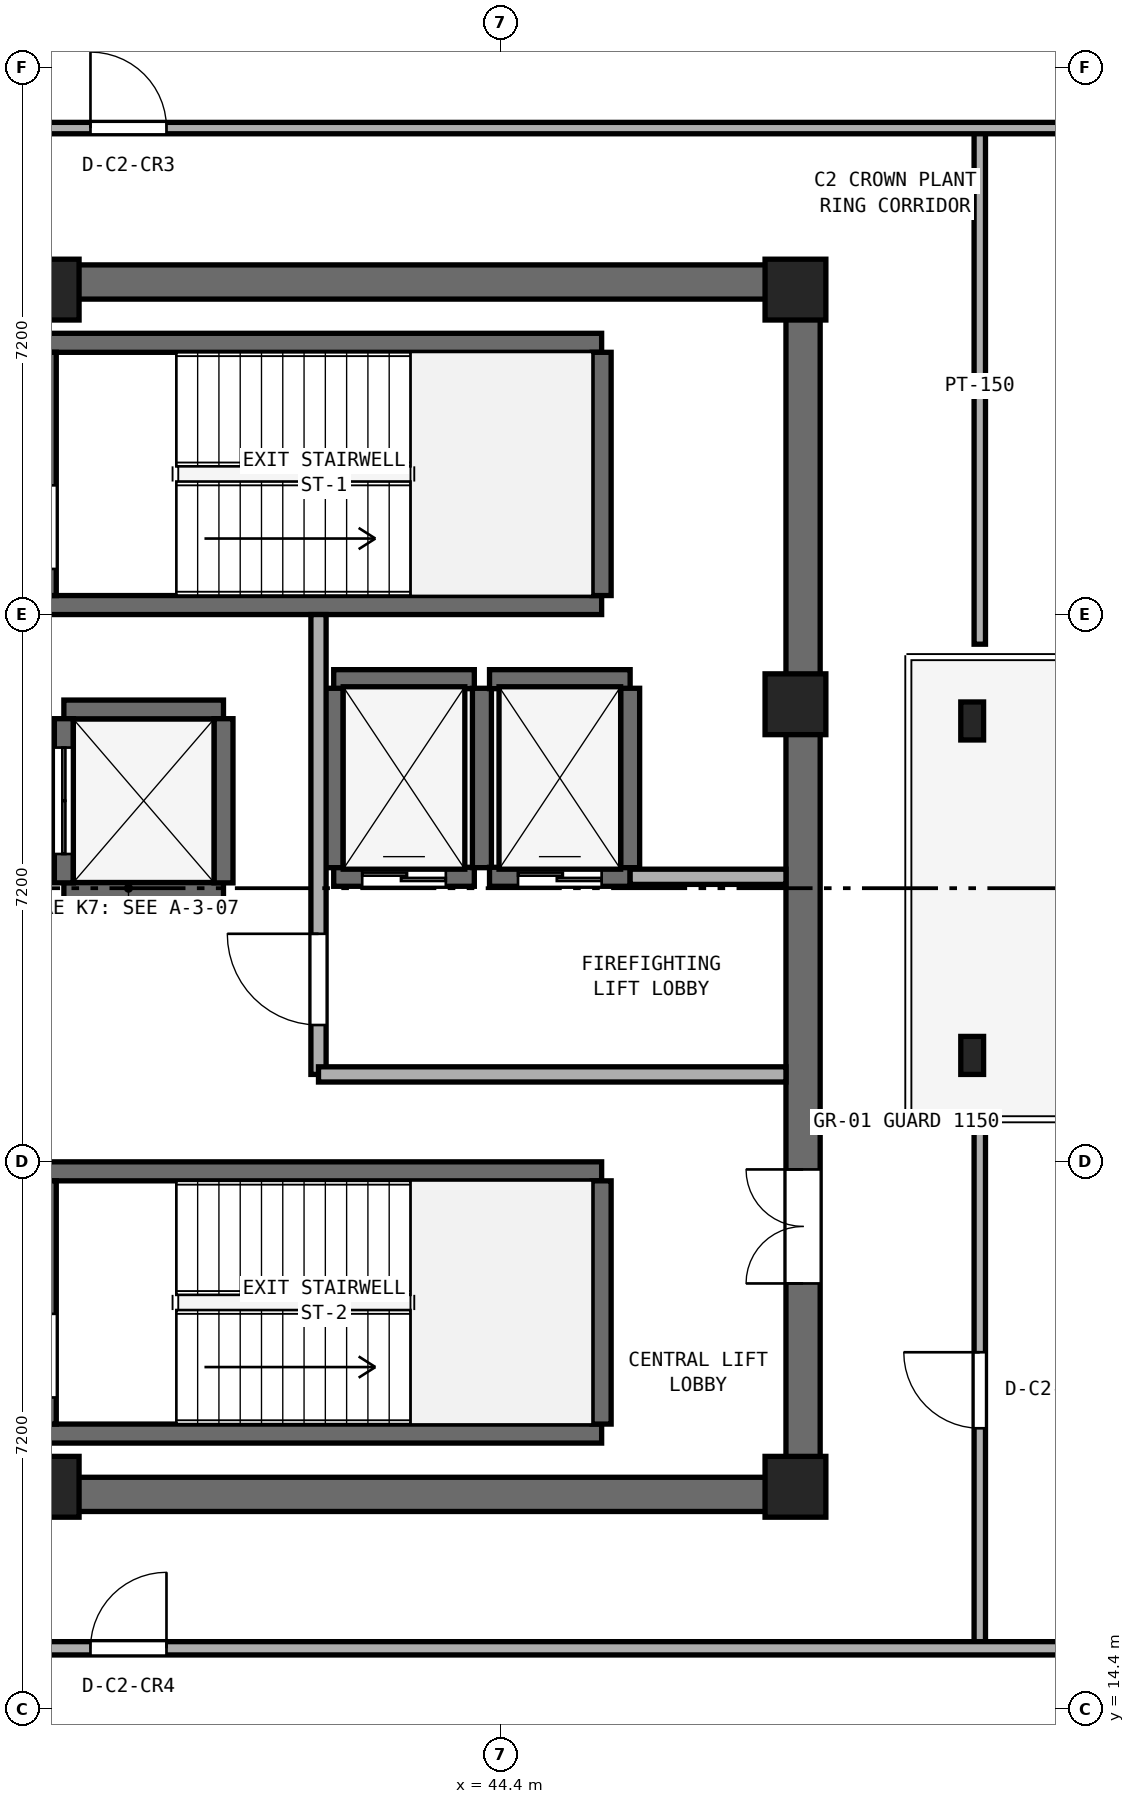
"""IFC4 building model, lengths in metres.
Left out: names, types, materials, properties, quantities, classifications, styles, units other than length and angle.
Written with IfcOpenShell. Run it as: python <this file> out.ifc"""

import sys

from ifc_helpers import new_model, si_unit, direction, frame, frame_2d, origin, origin_2d, place, context, subcontext, project, spatial, rectangle, i_section, extrude, element, fill, save


model = new_model("IFC4")
c1 = context("Model", 3, precision=1e-05, world=origin(), true_north=direction((0.0, 1.0)))
c2 = subcontext(c1, "Body", "Model", "MODEL_VIEW")
j1 = project(units=[si_unit("LENGTHUNIT", "METRE"), si_unit("PLANEANGLEUNIT", "RADIAN")], contexts=[c1])
p1 = place(None, origin())
s1 = spatial("IfcSite", under=j1, at=p1, CompositionType="ELEMENT")
p2 = place(p1, origin())
s2 = spatial("IfcBuilding", under=s1, at=p2, CompositionType="ELEMENT")
p3 = place(p2, frame((0.0, 0.0, 317.4)))
s3 = spatial("IfcBuildingStorey", under=s2, at=p3, CompositionType="ELEMENT", Elevation=317.4)
for number, where, z_axis, x_axis in (
    (1, (50.6, 23.0, 0.0), (0.0, 0.0, 1.0), (1.0, 0.0, 0.0)),
    (2, (50.6, 27.4, 0.0), (0.0, 0.0, 1.0), (1.0, 0.0, 0.0)),
):
    element("IfcColumn", number, at=place(p3, frame(where, z_axis=z_axis, x_axis=x_axis)), inside=s3, PredefinedType="COLUMN", context=c2, shape_type="SweptSolid", body=[
        extrude(i_section(OverallWidth=0.3, OverallDepth=0.5, WebThickness=0.014, FlangeThickness=0.028, at=origin_2d()), origin(), (0.0, 0.0, 1.0), 3.72),
    ])
for number, where, z_axis, x_axis in (
    (3, (30.4, 17.225, 0.0), (0.0, 0.0, 1.0), (1.0, 0.0, 0.0)),
    (4, (30.4, 33.175, 0.0), (0.0, 0.0, 1.0), (1.0, 0.0, 0.0)),
):
    element("IfcWall", number, at=place(p3, frame(where, z_axis=z_axis, x_axis=x_axis)), inside=s3, PredefinedType="SHEAR", context=c2, shape_type="SweptSolid", body=[
        extrude(rectangle(XDim=18.2, YDim=0.45, at=frame_2d((9.1, 0.0))), origin(), (0.0, 0.0, 1.0), 3.72),
    ])
p4 = place(p3, frame((48.375, 17.45, 0.0), z_axis=(0.0, 0.0, 1.0), x_axis=(0.0, 1.0, 0.0)))
e5 = element("IfcWall", 5, at=p4, inside=s3, PredefinedType="SHEAR", context=c2, shape_type="SweptSolid", body=[
    extrude(rectangle(XDim=15.5, YDim=0.45, at=frame_2d((7.75, 0.0))), origin(), (0.0, 0.0, 1.0), 3.72),
])
p5 = place(p4, frame((2.55, 0.0, 0.0)))
e6 = element("IfcOpeningElement", 6, at=p5, cuts=e5, PredefinedType="OPENING", context=c2, shape_type="SweptSolid", body=[
    extrude(rectangle(XDim=1.5, YDim=2.15, at=frame_2d((0.75, 1.075))), frame((0.0, 0.235, 0.0), z_axis=(0.0, -1.0, 0.0), x_axis=(1.0, 0.0, 0.0)), (0.0, 0.0, 1.0), 0.47),
])
for number, where, z_axis, x_axis in (
    (7, (38.45, 17.325, 0.0), (0.0, 0.0, 1.0), (1.0, 0.0, 0.0)),
    (8, (48.275, 17.325, 0.0), (0.0, 0.0, 1.0), (1.0, 0.0, 0.0)),
    (9, (48.275, 27.62, 0.0), (0.0, 0.0, 1.0), (1.0, 0.0, 0.0)),
    (10, (48.275, 33.075, 0.0), (0.0, 0.0, 1.0), (1.0, 0.0, 0.0)),
    (11, (38.45, 33.075, 0.0), (0.0, 0.0, 1.0), (1.0, 0.0, 0.0)),
):
    element("IfcColumn", number, at=place(p3, frame(where, z_axis=z_axis, x_axis=x_axis)), inside=s3, PredefinedType="PILASTER", context=c2, shape_type="SweptSolid", body=[
        extrude(rectangle(XDim=0.8, YDim=0.8, at=origin_2d()), origin(), (0.0, 0.0, 1.0), 4.0),
    ])
for number, where, z_axis, x_axis in (
    (12, (38.425, 28.925, 0.0), (0.0, 0.0, 1.0), (1.0, 0.0, 0.0)),
    (13, (38.425, 32.375, 0.0), (0.0, 0.0, 1.0), (1.0, 0.0, 0.0)),
):
    element("IfcWall", number, at=place(p3, frame(where, z_axis=z_axis, x_axis=x_axis)), inside=s3, PredefinedType="SHEAR", context=c2, shape_type="SweptSolid", body=[
        extrude(rectangle(XDim=7.3, YDim=0.25, at=frame_2d((3.65, 0.0))), origin(), (0.0, 0.0, 1.0), 3.72),
    ])
p6 = place(p3, frame((38.425, 29.05, 0.0), z_axis=(0.0, 0.0, 1.0), x_axis=(0.0, 1.0, 0.0)))
e14 = element("IfcWall", 14, at=p6, inside=s3, PredefinedType="SHEAR", context=c2, shape_type="SweptSolid", body=[
    extrude(rectangle(XDim=3.2, YDim=0.25, at=frame_2d((1.6, 0.0))), origin(), (0.0, 0.0, 1.0), 3.72),
])
p7 = place(p6, frame((0.35, 0.0, 0.0)))
e15 = element("IfcOpeningElement", 15, at=p7, cuts=e14, PredefinedType="OPENING", context=c2, shape_type="SweptSolid", body=[
    extrude(rectangle(XDim=1.1, YDim=2.15, at=frame_2d((0.55, 1.075))), frame((0.0, 0.135, 0.0), z_axis=(0.0, -1.0, 0.0), x_axis=(1.0, 0.0, 0.0)), (0.0, 0.0, 1.0), 0.27),
])
p8 = place(p3, frame((45.725, 29.05, 0.0), z_axis=(0.0, 0.0, 1.0), x_axis=(0.0, 1.0, 0.0)))
e16 = element("IfcWall", 16, at=p8, inside=s3, PredefinedType="SHEAR", context=c2, shape_type="SweptSolid", body=[
    extrude(rectangle(XDim=3.2, YDim=0.25, at=frame_2d((1.6, 0.0))), origin(), (0.0, 0.0, 1.0), 3.72),
])
for number, where, z_axis, x_axis in (
    (17, (38.425, 18.025, 0.0), (0.0, 0.0, 1.0), (1.0, 0.0, 0.0)),
    (18, (38.425, 21.475, 0.0), (0.0, 0.0, 1.0), (1.0, 0.0, 0.0)),
):
    element("IfcWall", number, at=place(p3, frame(where, z_axis=z_axis, x_axis=x_axis)), inside=s3, PredefinedType="SHEAR", context=c2, shape_type="SweptSolid", body=[
        extrude(rectangle(XDim=7.3, YDim=0.25, at=frame_2d((3.65, 0.0))), origin(), (0.0, 0.0, 1.0), 3.72),
    ])
p9 = place(p3, frame((38.425, 18.15, 0.0), z_axis=(0.0, 0.0, 1.0), x_axis=(0.0, 1.0, 0.0)))
e19 = element("IfcWall", 19, at=p9, inside=s3, PredefinedType="SHEAR", context=c2, shape_type="SweptSolid", body=[
    extrude(rectangle(XDim=3.2, YDim=0.25, at=frame_2d((1.6, 0.0))), origin(), (0.0, 0.0, 1.0), 3.72),
])
p10 = place(p9, frame((0.35, 0.0, 0.0)))
e20 = element("IfcOpeningElement", 20, at=p10, cuts=e19, PredefinedType="OPENING", context=c2, shape_type="SweptSolid", body=[
    extrude(rectangle(XDim=1.1, YDim=2.15, at=frame_2d((0.55, 1.075))), frame((0.0, 0.135, 0.0), z_axis=(0.0, -1.0, 0.0), x_axis=(1.0, 0.0, 0.0)), (0.0, 0.0, 1.0), 0.27),
])
p11 = place(p3, frame((45.725, 18.15, 0.0), z_axis=(0.0, 0.0, 1.0), x_axis=(0.0, 1.0, 0.0)))
e21 = element("IfcWall", 21, at=p11, inside=s3, PredefinedType="SHEAR", context=c2, shape_type="SweptSolid", body=[
    extrude(rectangle(XDim=3.2, YDim=0.25, at=frame_2d((1.6, 0.0))), origin(), (0.0, 0.0, 1.0), 3.72),
])
p12 = place(p3, frame((42.2, 25.35, 0.0), z_axis=(0.0, 0.0, 1.0), x_axis=(1.0, 0.0, 0.0)))
e22 = element("IfcWall", 22, at=p12, inside=s3, PredefinedType="SHEAR", context=c2, shape_type="SweptSolid", body=[
    extrude(rectangle(XDim=1.85, YDim=0.25, at=frame_2d((0.925, 0.0))), origin(), (0.0, 0.0, 1.0), 3.72),
])
p13 = place(p12, frame((0.375, 0.0, 0.0)))
e23 = element("IfcOpeningElement", 23, at=p13, cuts=e22, PredefinedType="OPENING", context=c2, shape_type="SweptSolid", body=[
    extrude(rectangle(XDim=1.1, YDim=2.15, at=frame_2d((0.55, 1.075))), frame((0.0, 0.135, 0.0), z_axis=(0.0, -1.0, 0.0), x_axis=(1.0, 0.0, 0.0)), (0.0, 0.0, 1.0), 0.27),
])
p14 = place(p3, frame((42.2, 27.95, 0.0), z_axis=(0.0, 0.0, 1.0), x_axis=(1.0, 0.0, 0.0)))
e24 = element("IfcWall", 24, at=p14, inside=s3, PredefinedType="SHEAR", context=c2, shape_type="SweptSolid", body=[
    extrude(rectangle(XDim=1.85, YDim=0.25, at=frame_2d((0.925, 0.0))), origin(), (0.0, 0.0, 1.0), 3.72),
])
for number, where, z_axis, x_axis in (
    (25, (42.2, 25.47, 0.0), (0.0, 0.0, 1.0), (0.0, 1.0, 0.0)),
    (26, (44.15, 25.47, 0.0), (0.0, 0.0, 1.0), (0.0, 1.0, 0.0)),
):
    element("IfcWall", number, at=place(p3, frame(where, z_axis=z_axis, x_axis=x_axis)), inside=s3, PredefinedType="SHEAR", context=c2, shape_type="SweptSolid", body=[
        extrude(rectangle(XDim=2.36, YDim=0.25, at=frame_2d((1.18, 0.0))), origin(), (0.0, 0.0, 1.0), 3.72),
    ])
p15 = place(p3, frame((44.25, 25.35, 0.0), z_axis=(0.0, 0.0, 1.0), x_axis=(1.0, 0.0, 0.0)))
e27 = element("IfcWall", 27, at=p15, inside=s3, PredefinedType="SHEAR", context=c2, shape_type="SweptSolid", body=[
    extrude(rectangle(XDim=1.85, YDim=0.25, at=frame_2d((0.925, 0.0))), origin(), (0.0, 0.0, 1.0), 3.72),
])
p16 = place(p15, frame((0.375, 0.0, 0.0)))
e28 = element("IfcOpeningElement", 28, at=p16, cuts=e27, PredefinedType="OPENING", context=c2, shape_type="SweptSolid", body=[
    extrude(rectangle(XDim=1.1, YDim=2.15, at=frame_2d((0.55, 1.075))), frame((0.0, 0.135, 0.0), z_axis=(0.0, -1.0, 0.0), x_axis=(1.0, 0.0, 0.0)), (0.0, 0.0, 1.0), 0.27),
])
p17 = place(p3, frame((44.25, 27.95, 0.0), z_axis=(0.0, 0.0, 1.0), x_axis=(1.0, 0.0, 0.0)))
e29 = element("IfcWall", 29, at=p17, inside=s3, PredefinedType="SHEAR", context=c2, shape_type="SweptSolid", body=[
    extrude(rectangle(XDim=1.85, YDim=0.25, at=frame_2d((0.925, 0.0))), origin(), (0.0, 0.0, 1.0), 3.72),
])
p18 = place(p3, frame((46.1, 25.47, 0.0), z_axis=(0.0, 0.0, 1.0), x_axis=(0.0, 1.0, 0.0)))
e30 = element("IfcWall", 30, at=p18, inside=s3, PredefinedType="SHEAR", context=c2, shape_type="SweptSolid", body=[
    extrude(rectangle(XDim=2.36, YDim=0.25, at=frame_2d((1.18, 0.0))), origin(), (0.0, 0.0, 1.0), 3.72),
])
for number, where, z_axis, x_axis in (
    (31, (38.65, 25.15, 0.0), (0.0, 0.0, 1.0), (1.0, 0.0, 0.0)),
    (32, (38.65, 27.55, 0.0), (0.0, 0.0, 1.0), (1.0, 0.0, 0.0)),
):
    element("IfcWall", number, at=place(p3, frame(where, z_axis=z_axis, x_axis=x_axis)), inside=s3, PredefinedType="SHEAR", context=c2, shape_type="SweptSolid", body=[
        extrude(rectangle(XDim=2.1, YDim=0.25, at=frame_2d((1.05, 0.0))), origin(), (0.0, 0.0, 1.0), 3.72),
    ])
p19 = place(p3, frame((38.65, 25.27, 0.0), z_axis=(0.0, 0.0, 1.0), x_axis=(0.0, 1.0, 0.0)))
e33 = element("IfcWall", 33, at=p19, inside=s3, PredefinedType="SHEAR", context=c2, shape_type="SweptSolid", body=[
    extrude(rectangle(XDim=2.16, YDim=0.25, at=frame_2d((1.08, 0.0))), origin(), (0.0, 0.0, 1.0), 3.72),
])
p20 = place(p19, frame((0.38, 0.0, 0.0)))
e34 = element("IfcOpeningElement", 34, at=p20, cuts=e33, PredefinedType="OPENING", context=c2, shape_type="SweptSolid", body=[
    extrude(rectangle(XDim=1.4, YDim=2.2, at=frame_2d((0.7, 1.1))), frame((0.0, 0.135, 0.0), z_axis=(0.0, -1.0, 0.0), x_axis=(1.0, 0.0, 0.0)), (0.0, 0.0, 1.0), 0.27),
])
p21 = place(p3, frame((40.75, 25.27, 0.0), z_axis=(0.0, 0.0, 1.0), x_axis=(0.0, 1.0, 0.0)))
e35 = element("IfcWall", 35, at=p21, inside=s3, PredefinedType="SHEAR", context=c2, shape_type="SweptSolid", body=[
    extrude(rectangle(XDim=2.16, YDim=0.25, at=frame_2d((1.08, 0.0))), origin(), (0.0, 0.0, 1.0), 3.72),
])
p22 = place(p3, frame((42.0, 22.75, 0.0), z_axis=(0.0, 0.0, 1.0), x_axis=(0.0, 1.0, 0.0)))
e36 = element("IfcWall", 36, at=p22, inside=s3, PredefinedType="SOLIDWALL", context=c2, shape_type="SweptSolid", body=[
    extrude(rectangle(XDim=6.05, YDim=0.2, at=frame_2d((3.025, 0.0))), origin(), (0.0, 0.0, 1.0), 3.72),
])
p23 = place(p22, frame((0.65, 0.0, 0.0)))
e37 = element("IfcOpeningElement", 37, at=p23, cuts=e36, PredefinedType="OPENING", context=c2, shape_type="SweptSolid", body=[
    extrude(rectangle(XDim=1.2, YDim=2.15, at=frame_2d((0.6, 1.075))), frame((0.0, 0.11, 0.0), z_axis=(0.0, -1.0, 0.0), x_axis=(1.0, 0.0, 0.0)), (0.0, 0.0, 1.0), 0.22),
])
p24 = place(p3, frame((42.0, 22.75, 0.0), z_axis=(0.0, 0.0, 1.0), x_axis=(1.0, 0.0, 0.0)))
e38 = element("IfcWall", 38, at=p24, inside=s3, PredefinedType="SOLIDWALL", context=c2, shape_type="SweptSolid", body=[
    extrude(rectangle(XDim=6.15, YDim=0.2, at=frame_2d((3.075, 0.0))), origin(), (0.0, 0.0, 1.0), 3.72),
])
p25 = place(p3, frame((46.1, 25.35, 0.0), z_axis=(0.0, 0.0, 1.0), x_axis=(1.0, 0.0, 0.0)))
e39 = element("IfcWall", 39, at=p25, inside=s3, PredefinedType="SOLIDWALL", context=c2, shape_type="SweptSolid", body=[
    extrude(rectangle(XDim=2.05, YDim=0.2, at=frame_2d((1.025, 0.0))), origin(), (0.0, 0.0, 1.0), 3.72),
])
p26 = place(p3, frame((50.7, 15.2, 0.0), z_axis=(0.0, 0.0, 1.0), x_axis=(0.0, 1.0, 0.0)))
e40 = element("IfcWall", 40, at=p26, inside=s3, PredefinedType="PARTITIONING", context=c2, shape_type="SweptSolid", body=[
    extrude(rectangle(XDim=6.79, YDim=0.15, at=frame_2d((3.395, 0.0))), origin(), (0.0, 0.0, 1.0), 3.72),
])
p27 = place(p26, frame((2.895, 0.0, 0.0)))
e41 = element("IfcOpeningElement", 41, at=p27, cuts=e40, PredefinedType="OPENING", context=c2, shape_type="SweptSolid", body=[
    extrude(rectangle(XDim=1.0, YDim=2.12, at=frame_2d((0.5, 1.06))), frame((0.0, 0.085, 0.0), z_axis=(0.0, -1.0, 0.0), x_axis=(1.0, 0.0, 0.0)), (0.0, 0.0, 1.0), 0.17),
])
p28 = place(p3, frame((50.7, 28.41, 0.0), z_axis=(0.0, 0.0, 1.0), x_axis=(0.0, 1.0, 0.0)))
e42 = element("IfcWall", 42, at=p28, inside=s3, PredefinedType="PARTITIONING", context=c2, shape_type="SweptSolid", body=[
    extrude(rectangle(XDim=6.79, YDim=0.15, at=frame_2d((3.395, 0.0))), origin(), (0.0, 0.0, 1.0), 3.72),
])
p29 = place(p3, frame((19.292, 15.2, 0.0), z_axis=(0.0, 0.0, 1.0), x_axis=(1.0, 0.0, 0.0)))
e43 = element("IfcWall", 43, at=p29, inside=s3, PredefinedType="PARTITIONING", context=c2, shape_type="SweptSolid", body=[
    extrude(rectangle(XDim=39.076, YDim=0.175, at=frame_2d((19.538, 0.0))), origin(), (0.0, 0.0, 1.0), 2.37),
])
p30 = place(p29, frame((19.708, 0.0, 0.0)))
e44 = element("IfcOpeningElement", 44, at=p30, cuts=e43, PredefinedType="OPENING", context=c2, shape_type="SweptSolid", body=[
    extrude(rectangle(XDim=1.0, YDim=2.12, at=frame_2d((0.5, 1.06))), frame((0.0, 0.097, 0.0), z_axis=(0.0, -1.0, 0.0), x_axis=(1.0, 0.0, 0.0)), (0.0, 0.0, 1.0), 0.195),
])
p31 = place(p3, frame((20.01, 35.2, 0.0), z_axis=(0.0, 0.0, 1.0), x_axis=(1.0, 0.0, 0.0)))
e45 = element("IfcWall", 45, at=p31, inside=s3, PredefinedType="PARTITIONING", context=c2, shape_type="SweptSolid", body=[
    extrude(rectangle(XDim=39.04, YDim=0.15, at=frame_2d((19.52, 0.0))), origin(), (0.0, 0.0, 1.0), 2.37),
])
p32 = place(p31, frame((18.99, 0.0, 0.0)))
e46 = element("IfcOpeningElement", 46, at=p32, cuts=e45, PredefinedType="OPENING", context=c2, shape_type="SweptSolid", body=[
    extrude(rectangle(XDim=1.0, YDim=2.12, at=frame_2d((0.5, 1.06))), frame((0.0, 0.085, 0.0), z_axis=(0.0, -1.0, 0.0), x_axis=(1.0, 0.0, 0.0)), (0.0, 0.0, 1.0), 0.17),
])
p33 = place(p3, frame((47.908, 6.388, 0.0), z_axis=(0.0, 0.0, 1.0), x_axis=(0.763574643448, 0.645719570621, 0.0)))
e47 = element("IfcWall", 47, at=p33, inside=s3, PredefinedType="STANDARD", context=c2, shape_type="SweptSolid", body=[
    extrude(rectangle(XDim=13.616, YDim=0.28, at=frame_2d((6.808, 0.0))), origin(), (0.0, 0.0, 1.0), 3.72),
])
p34 = place(p33, frame((1.803, 0.0, 0.9)))
e48 = element("IfcOpeningElement", 48, at=p34, cuts=e47, PredefinedType="OPENING", context=c2, shape_type="SweptSolid", body=[
    extrude(rectangle(XDim=1.6, YDim=1.45, at=frame_2d((0.8, 0.725))), frame((0.0, 0.15, 0.0), z_axis=(0.0, -1.0, 0.0), x_axis=(1.0, 0.0, 0.0)), (0.0, 0.0, 1.0), 0.3),
])
p35 = place(p33, frame((6.008, 0.0, 0.9)))
e49 = element("IfcOpeningElement", 49, at=p35, cuts=e47, PredefinedType="OPENING", context=c2, shape_type="SweptSolid", body=[
    extrude(rectangle(XDim=1.6, YDim=1.45, at=frame_2d((0.8, 0.725))), frame((0.0, 0.15, 0.0), z_axis=(0.0, -1.0, 0.0), x_axis=(1.0, 0.0, 0.0)), (0.0, 0.0, 1.0), 0.3),
])
p36 = place(p33, frame((10.213, 0.0, 0.9)))
e50 = element("IfcOpeningElement", 50, at=p36, cuts=e47, PredefinedType="OPENING", context=c2, shape_type="SweptSolid", body=[
    extrude(rectangle(XDim=1.6, YDim=1.45, at=frame_2d((0.8, 0.725))), frame((0.0, 0.15, 0.0), z_axis=(0.0, -1.0, 0.0), x_axis=(1.0, 0.0, 0.0)), (0.0, 0.0, 1.0), 0.3),
])
p37 = place(p13, origin())
e51 = element("IfcDoor", 51, at=p37, inside=s3, OperationType="DOUBLE_DOOR_SLIDING", PredefinedType="DOOR", context=c2, shape_type="SweptSolid", body=[
    extrude(rectangle(XDim=1.1, YDim=2.15, at=frame_2d((0.55, 1.075))), frame((0.0, 0.025, 0.0), z_axis=(0.0, -1.0, 0.0), x_axis=(1.0, 0.0, 0.0)), (0.0, 0.0, 1.0), 0.05),
])
fill(e23, e51)
p38 = place(p16, origin())
e52 = element("IfcDoor", 52, at=p38, inside=s3, OperationType="DOUBLE_DOOR_SLIDING", PredefinedType="DOOR", context=c2, shape_type="SweptSolid", body=[
    extrude(rectangle(XDim=1.1, YDim=2.15, at=frame_2d((0.55, 1.075))), frame((0.0, 0.025, 0.0), z_axis=(0.0, -1.0, 0.0), x_axis=(1.0, 0.0, 0.0)), (0.0, 0.0, 1.0), 0.05),
])
fill(e28, e52)
p39 = place(p20, origin())
e53 = element("IfcDoor", 53, at=p39, inside=s3, OperationType="DOUBLE_DOOR_SLIDING", PredefinedType="DOOR", context=c2, shape_type="SweptSolid", body=[
    extrude(rectangle(XDim=1.4, YDim=2.2, at=frame_2d((0.7, 1.1))), frame((0.0, 0.025, 0.0), z_axis=(0.0, -1.0, 0.0), x_axis=(1.0, 0.0, 0.0)), (0.0, 0.0, 1.0), 0.05),
])
fill(e34, e53)
p40 = place(p23, origin())
e54 = element("IfcDoor", 54, at=p40, inside=s3, OperationType="SINGLE_SWING_RIGHT", PredefinedType="DOOR", context=c2, shape_type="SweptSolid", body=[
    extrude(rectangle(XDim=1.2, YDim=2.15, at=frame_2d((0.6, 1.075))), frame((0.0, 0.025, 0.0), z_axis=(0.0, -1.0, 0.0), x_axis=(1.0, 0.0, 0.0)), (0.0, 0.0, 1.0), 0.05),
])
fill(e37, e54)
p41 = place(p5, origin())
e55 = element("IfcDoor", 55, at=p41, inside=s3, OperationType="DOUBLE_DOOR_SINGLE_SWING", PredefinedType="DOOR", context=c2, shape_type="SweptSolid", body=[
    extrude(rectangle(XDim=1.5, YDim=2.15, at=frame_2d((0.75, 1.075))), frame((0.0, 0.025, 0.0), z_axis=(0.0, -1.0, 0.0), x_axis=(1.0, 0.0, 0.0)), (0.0, 0.0, 1.0), 0.05),
])
fill(e6, e55)
p42 = place(p27, origin())
e56 = element("IfcDoor", 56, at=p42, inside=s3, OperationType="SINGLE_SWING_RIGHT", PredefinedType="DOOR", context=c2, shape_type="SweptSolid", body=[
    extrude(rectangle(XDim=1.0, YDim=2.12, at=frame_2d((0.5, 1.06))), frame((0.0, 0.025, 0.0), z_axis=(0.0, -1.0, 0.0), x_axis=(1.0, 0.0, 0.0)), (0.0, 0.0, 1.0), 0.05),
])
fill(e41, e56)
p43 = place(p32, origin())
e57 = element("IfcDoor", 57, at=p43, inside=s3, OperationType="SINGLE_SWING_LEFT", PredefinedType="DOOR", context=c2, shape_type="SweptSolid", body=[
    extrude(rectangle(XDim=1.0, YDim=2.12, at=frame_2d((0.5, 1.06))), frame((0.0, 0.025, 0.0), z_axis=(0.0, -1.0, 0.0), x_axis=(1.0, 0.0, 0.0)), (0.0, 0.0, 1.0), 0.05),
])
fill(e46, e57)
p44 = place(p30, origin())
e58 = element("IfcDoor", 58, at=p44, inside=s3, OperationType="SINGLE_SWING_RIGHT", PredefinedType="DOOR", context=c2, shape_type="SweptSolid", body=[
    extrude(rectangle(XDim=1.0, YDim=2.12, at=frame_2d((0.5, 1.06))), frame((0.0, 0.025, 0.0), z_axis=(0.0, -1.0, 0.0), x_axis=(1.0, 0.0, 0.0)), (0.0, 0.0, 1.0), 0.05),
])
fill(e44, e58)
save(model, sys.argv[1])
